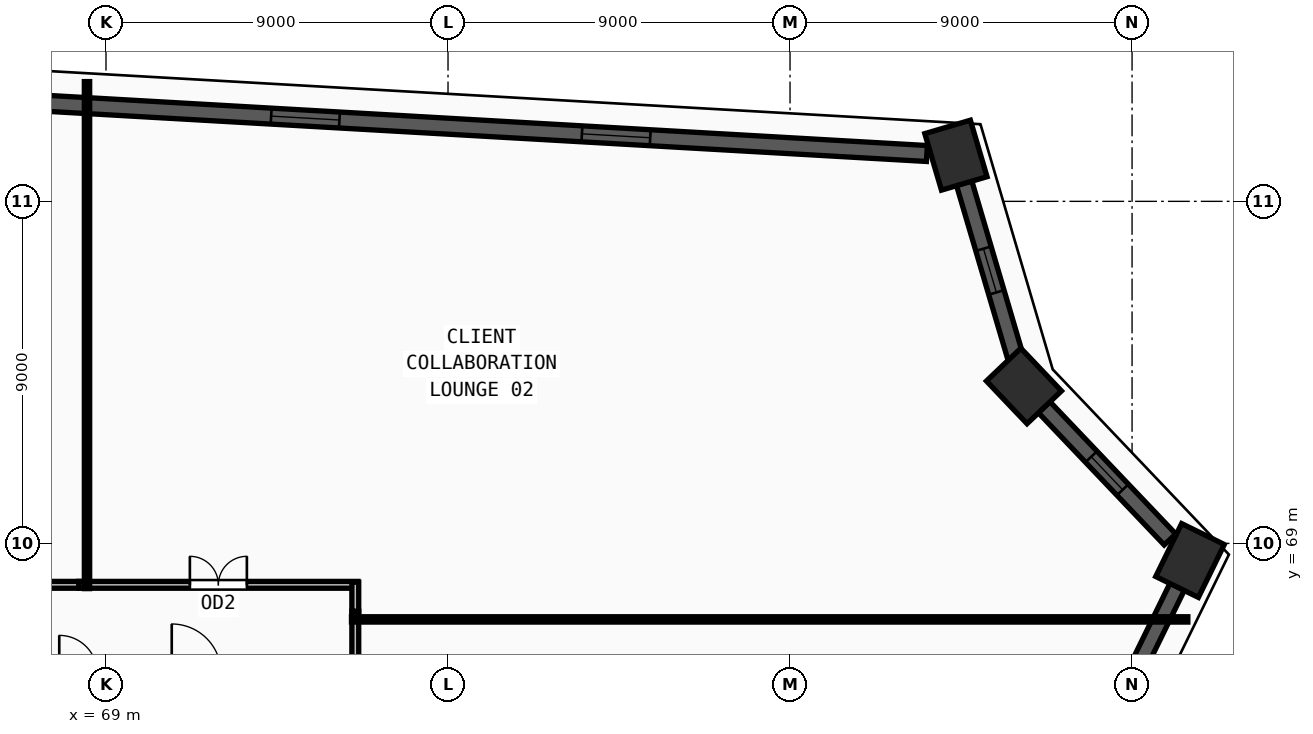
"""IFC4 building model, lengths in metres.
Left out: names, types, materials, properties, quantities, classifications, styles, units other than length and angle.
Written with IfcOpenShell. Run it as: python <this file> out.ifc"""

import sys

from ifc_helpers import new_model, si_unit, direction, frame, frame_2d, origin, origin_2d, place, context, subcontext, project, spatial, rectangle, extrude, source, transform, mapped, element, fill, save


model = new_model("IFC4")
c1 = context("Model", 3, precision=1e-05, world=origin(), true_north=direction((0.0, 1.0)))
c2 = subcontext(c1, "Body", "Model", "MODEL_VIEW")
j1 = project(units=[si_unit("LENGTHUNIT", "METRE"), si_unit("PLANEANGLEUNIT", "RADIAN")], contexts=[c1])
p1 = place(None, origin())
s1 = spatial("IfcSite", under=j1, at=p1, CompositionType="ELEMENT")
p2 = place(p1, origin())
s2 = spatial("IfcBuilding", under=s1, at=p2, CompositionType="ELEMENT")
p3 = place(p2, frame((0.0, 0.0, 85.5)))
s3 = spatial("IfcBuildingStorey", under=s2, at=p3, CompositionType="ELEMENT", Elevation=85.5)
m1 = source(origin(), c2, "Body", "SweptSolid", [
    extrude(rectangle(XDim=1.55, YDim=1.25, at=origin_2d()), origin(), (0.0, 0.0, 1.0), 3.75),
])
for number, where, z_axis, x_axis in (
    (1, (91.365, 79.215, 0.0), (0.0, 0.0, 1.0), (-0.283, 0.959, 0.0)),
    (2, (93.155, 73.142, 0.0), (0.0, 0.0, 1.0), (-0.689, 0.724, 0.0)),
    (3, (97.525, 68.55, 0.0), (0.0, 0.0, 1.0), (0.44, 0.898, 0.0)),
):
    element("IfcColumn", number, at=place(p3, frame(where, z_axis=z_axis, x_axis=x_axis)), inside=s3, PredefinedType="COLUMN", context=c2, shape_type="MappedRepresentation", body=[
        mapped(m1, transform((0.0, 0.0, 0.0), x_axis=(1.0, 0.0, 0.0), y_axis=(0.0, 1.0, 0.0), z_axis=(0.0, 0.0, 1.0), scale=1.0)),
    ])
p4 = place(p3, frame((85.303, 43.594, 0.0), z_axis=(0.0, 0.0, 1.0), x_axis=(0.43984083091, 0.898075744837, 0.0)))
e4 = element("IfcWall", 4, at=p4, inside=s3, PredefinedType="SOLIDWALL", context=c2, shape_type="SweptSolid", body=[
    extrude(rectangle(XDim=27.023, YDim=0.42, at=frame_2d((13.512, 0.0))), origin(), (0.0, 0.0, 1.0), 3.57),
])
m2 = source(origin(), c2, "Body", "SweptSolid", [
    extrude(rectangle(XDim=1.8, YDim=1.95, at=frame_2d((0.9, 0.975))), frame((0.0, 0.22, 0.0), z_axis=(0.0, -1.0, 0.0), x_axis=(1.0, 0.0, 0.0)), (0.0, 0.0, 1.0), 0.44),
])
p5 = place(p4, frame((5.856, 0.0, 0.55)))
e5 = element("IfcOpeningElement", 5, at=p5, cuts=e4, PredefinedType="OPENING", context=c2, shape_type="MappedRepresentation", body=[
    mapped(m2, transform((0.0, 0.0, 0.0), x_axis=(1.0, 0.0, 0.0), y_axis=(0.0, 1.0, 0.0), z_axis=(0.0, 0.0, 1.0), scale=1.0)),
])
p6 = place(p4, frame((12.612, 0.0, 0.55)))
e6 = element("IfcOpeningElement", 6, at=p6, cuts=e4, PredefinedType="OPENING", context=c2, shape_type="MappedRepresentation", body=[
    mapped(m2, transform((0.0, 0.0, 0.0), x_axis=(1.0, 0.0, 0.0), y_axis=(0.0, 1.0, 0.0), z_axis=(0.0, 0.0, 1.0), scale=1.0)),
])
p7 = place(p4, frame((19.368, 0.0, 0.55)))
e7 = element("IfcOpeningElement", 7, at=p7, cuts=e4, PredefinedType="OPENING", context=c2, shape_type="MappedRepresentation", body=[
    mapped(m2, transform((0.0, 0.0, 0.0), x_axis=(1.0, 0.0, 0.0), y_axis=(0.0, 1.0, 0.0), z_axis=(0.0, 0.0, 1.0), scale=1.0)),
])
p8 = place(p3, frame((96.998, 69.104, 0.0), z_axis=(0.0, 0.0, 1.0), x_axis=(-0.68945615516, 0.724327419136, 0.0)))
e8 = element("IfcWall", 8, at=p8, inside=s3, PredefinedType="SOLIDWALL", context=c2, shape_type="SweptSolid", body=[
    extrude(rectangle(XDim=4.81, YDim=0.42, at=frame_2d((2.405, 0.0))), origin(), (0.0, 0.0, 1.0), 3.57),
])
m3 = source(origin(), c2, "Body", "SweptSolid", [
    extrude(rectangle(XDim=1.2, YDim=1.9, at=frame_2d((0.6, 0.95))), frame((0.0, 0.22, 0.0), z_axis=(0.0, -1.0, 0.0), x_axis=(1.0, 0.0, 0.0)), (0.0, 0.0, 1.0), 0.44),
])
p9 = place(p8, frame((1.805, 0.0, 0.55)))
e9 = element("IfcOpeningElement", 9, at=p9, cuts=e8, PredefinedType="OPENING", context=c2, shape_type="MappedRepresentation", body=[
    mapped(m3, transform((0.0, 0.0, 0.0), x_axis=(1.0, 0.0, 0.0), y_axis=(0.0, 1.0, 0.0), z_axis=(0.0, 0.0, 1.0), scale=1.0)),
])
p10 = place(p3, frame((92.939, 73.876, 0.0), z_axis=(0.0, 0.0, 1.0), x_axis=(-0.28283801754, 0.959167689111, 0.0)))
e10 = element("IfcWall", 10, at=p10, inside=s3, PredefinedType="SOLIDWALL", context=c2, shape_type="SweptSolid", body=[
    extrude(rectangle(XDim=4.801, YDim=0.42, at=frame_2d((2.4, 0.0))), origin(), (0.0, 0.0, 1.0), 3.57),
])
p11 = place(p10, frame((1.801, 0.0, 0.55)))
e11 = element("IfcOpeningElement", 11, at=p11, cuts=e10, PredefinedType="OPENING", context=c2, shape_type="MappedRepresentation", body=[
    mapped(m3, transform((0.0, 0.0, 0.0), x_axis=(1.0, 0.0, 0.0), y_axis=(0.0, 1.0, 0.0), z_axis=(0.0, 0.0, 1.0), scale=1.0)),
])
p12 = place(p3, frame((90.601, 79.259, 0.0), z_axis=(0.0, 0.0, 1.0), x_axis=(-0.99837885552, 0.056918018682, 0.0)))
e12 = element("IfcWall", 12, at=p12, inside=s3, PredefinedType="SOLIDWALL", context=c2, shape_type="SweptSolid", body=[
    extrude(rectangle(XDim=32.766, YDim=0.42, at=frame_2d((16.383, 0.0))), origin(), (0.0, 0.0, 1.0), 3.57),
])
p13 = place(p12, frame((7.292, 0.0, 0.55)))
e13 = element("IfcOpeningElement", 13, at=p13, cuts=e12, PredefinedType="OPENING", context=c2, shape_type="MappedRepresentation", body=[
    mapped(m2, transform((0.0, 0.0, 0.0), x_axis=(1.0, 0.0, 0.0), y_axis=(0.0, 1.0, 0.0), z_axis=(0.0, 0.0, 1.0), scale=1.0)),
])
p14 = place(p12, frame((15.483, 0.0, 0.55)))
e14 = element("IfcOpeningElement", 14, at=p14, cuts=e12, PredefinedType="OPENING", context=c2, shape_type="MappedRepresentation", body=[
    mapped(m2, transform((0.0, 0.0, 0.0), x_axis=(1.0, 0.0, 0.0), y_axis=(0.0, 1.0, 0.0), z_axis=(0.0, 0.0, 1.0), scale=1.0)),
])
p15 = place(p12, frame((23.675, 0.0, 0.55)))
e15 = element("IfcOpeningElement", 15, at=p15, cuts=e12, PredefinedType="OPENING", context=c2, shape_type="MappedRepresentation", body=[
    mapped(m2, transform((0.0, 0.0, 0.0), x_axis=(1.0, 0.0, 0.0), y_axis=(0.0, 1.0, 0.0), z_axis=(0.0, 0.0, 1.0), scale=1.0)),
])
p16 = place(p3, frame((68.285, 67.91, 0.0), z_axis=(0.0, 0.0, 1.0), x_axis=(1.0, 0.0, 0.0)))
e16 = element("IfcWall", 16, at=p16, inside=s3, PredefinedType="PARTITIONING", context=c2, shape_type="SweptSolid", body=[
    extrude(rectangle(XDim=7.345, YDim=0.18, at=frame_2d((3.672, 0.0))), origin(), (0.0, 0.0, 1.0), 3.57),
])
m4 = source(origin(), c2, "Body", "SweptSolid", [
    extrude(rectangle(XDim=1.5, YDim=2.2, at=frame_2d((0.75, 1.1))), frame((0.0, 0.1, 0.0), z_axis=(0.0, -1.0, 0.0), x_axis=(1.0, 0.0, 0.0)), (0.0, 0.0, 1.0), 0.2),
])
p17 = place(p16, frame((2.922, 0.0, 0.0)))
e17 = element("IfcOpeningElement", 17, at=p17, cuts=e16, PredefinedType="OPENING", context=c2, shape_type="MappedRepresentation", body=[
    mapped(m4, transform((0.0, 0.0, 0.0), x_axis=(1.0, 0.0, 0.0), y_axis=(0.0, 1.0, 0.0), z_axis=(0.0, 0.0, 1.0), scale=1.0)),
])
p18 = place(p3, frame((75.56, 67.215, 0.0), z_axis=(0.0, 0.0, 1.0), x_axis=(0.0, -1.0, 0.0)))
e18 = element("IfcWall", 18, at=p18, inside=s3, PredefinedType="PARTITIONING", context=c2, shape_type="SweptSolid", body=[
    extrude(rectangle(XDim=2.235, YDim=0.18, at=frame_2d((1.118, 0.0))), origin(), (0.0, 0.0, 1.0), 3.57),
])
p19 = place(p3, frame((75.56, 67.98, 0.0), z_axis=(0.0, 0.0, 1.0), x_axis=(0.0, -1.0, 0.0)))
e19 = element("IfcWall", 19, at=p19, inside=s3, PredefinedType="PARTITIONING", context=c2, shape_type="SweptSolid", body=[
    extrude(rectangle(XDim=0.765, YDim=0.18, at=frame_2d((0.382, 0.0))), origin(), (0.0, 0.0, 1.0), 3.57),
])
p20 = place(p3, frame((61.09, 67.91, 0.0), z_axis=(0.0, 0.0, 1.0), x_axis=(1.0, 0.0, 0.0)))
e20 = element("IfcWall", 20, at=p20, inside=s3, PredefinedType="PARTITIONING", context=c2, shape_type="SweptSolid", body=[
    extrude(rectangle(XDim=7.195, YDim=0.18, at=frame_2d((3.597, 0.0))), origin(), (0.0, 0.0, 1.0), 3.57),
])
p21 = place(p3, frame((75.46, 67.0, 0.0), z_axis=(0.0, 0.0, 1.0), x_axis=(1.0, 0.0, 0.0)))
e21 = element("IfcWall", 21, at=p21, inside=s3, PredefinedType="PARTITIONING", context=c2, shape_type="SweptSolid", body=[
    extrude(rectangle(XDim=22.008, YDim=0.14, at=frame_2d((11.004, 0.0))), origin(), (0.0, 0.0, 1.0), 2.655),
])
p22 = place(p3, frame((68.5, 67.81, 0.0), z_axis=(0.0, 0.0, 1.0), x_axis=(0.0, 1.0, 0.0)))
e22 = element("IfcWall", 22, at=p22, inside=s3, PredefinedType="PARTITIONING", context=c2, shape_type="SweptSolid", body=[
    extrude(rectangle(XDim=13.341, YDim=0.14, at=frame_2d((6.67, 0.0))), origin(), (0.0, 0.0, 1.0), 3.57),
])
m5 = source(origin(), c2, "Body", "SweptSolid", [
    extrude(rectangle(XDim=1.2, YDim=1.9, at=frame_2d((0.6, 0.95))), frame((0.0, 0.03, 0.0), z_axis=(0.0, -1.0, 0.0), x_axis=(1.0, 0.0, 0.0)), (0.0, 0.0, 1.0), 0.06),
])
p23 = place(p9, origin())
e23 = element("IfcWindow", 23, at=p23, inside=s3, PartitioningType="SINGLE_PANEL", PredefinedType="WINDOW", context=c2, shape_type="MappedRepresentation", body=[
    mapped(m5, transform((0.0, 0.0, 0.0), x_axis=(1.0, 0.0, 0.0), y_axis=(0.0, 1.0, 0.0), z_axis=(0.0, 0.0, 1.0), scale=1.0)),
])
fill(e9, e23)
p24 = place(p11, origin())
e24 = element("IfcWindow", 24, at=p24, inside=s3, PartitioningType="SINGLE_PANEL", PredefinedType="WINDOW", context=c2, shape_type="MappedRepresentation", body=[
    mapped(m5, transform((0.0, 0.0, 0.0), x_axis=(1.0, 0.0, 0.0), y_axis=(0.0, 1.0, 0.0), z_axis=(0.0, 0.0, 1.0), scale=1.0)),
])
fill(e11, e24)
m6 = source(origin(), c2, "Body", "SweptSolid", [
    extrude(rectangle(XDim=1.8, YDim=1.95, at=frame_2d((0.9, 0.975))), frame((0.0, 0.03, 0.0), z_axis=(0.0, -1.0, 0.0), x_axis=(1.0, 0.0, 0.0)), (0.0, 0.0, 1.0), 0.06),
])
p25 = place(p13, origin())
e25 = element("IfcWindow", 25, at=p25, inside=s3, PartitioningType="DOUBLE_PANEL_VERTICAL", PredefinedType="WINDOW", context=c2, shape_type="MappedRepresentation", body=[
    mapped(m6, transform((0.0, 0.0, 0.0), x_axis=(1.0, 0.0, 0.0), y_axis=(0.0, 1.0, 0.0), z_axis=(0.0, 0.0, 1.0), scale=1.0)),
])
fill(e13, e25)
p26 = place(p14, origin())
e26 = element("IfcWindow", 26, at=p26, inside=s3, PartitioningType="DOUBLE_PANEL_VERTICAL", PredefinedType="WINDOW", context=c2, shape_type="MappedRepresentation", body=[
    mapped(m6, transform((0.0, 0.0, 0.0), x_axis=(1.0, 0.0, 0.0), y_axis=(0.0, 1.0, 0.0), z_axis=(0.0, 0.0, 1.0), scale=1.0)),
])
fill(e14, e26)
m7 = source(origin(), c2, "Body", "SweptSolid", [
    extrude(rectangle(XDim=1.5, YDim=2.2, at=frame_2d((0.75, 1.1))), frame((0.0, 0.025, 0.0), z_axis=(0.0, -1.0, 0.0), x_axis=(1.0, 0.0, 0.0)), (0.0, 0.0, 1.0), 0.05),
])
p27 = place(p17, origin())
e27 = element("IfcDoor", 27, at=p27, inside=s3, OperationType="DOUBLE_DOOR_SINGLE_SWING", PredefinedType="DOOR", context=c2, shape_type="MappedRepresentation", body=[
    mapped(m7, transform((0.0, 0.0, 0.0), x_axis=(1.0, 0.0, 0.0), y_axis=(0.0, 1.0, 0.0), z_axis=(0.0, 0.0, 1.0), scale=1.0)),
])
fill(e17, e27)
save(model, sys.argv[1])
